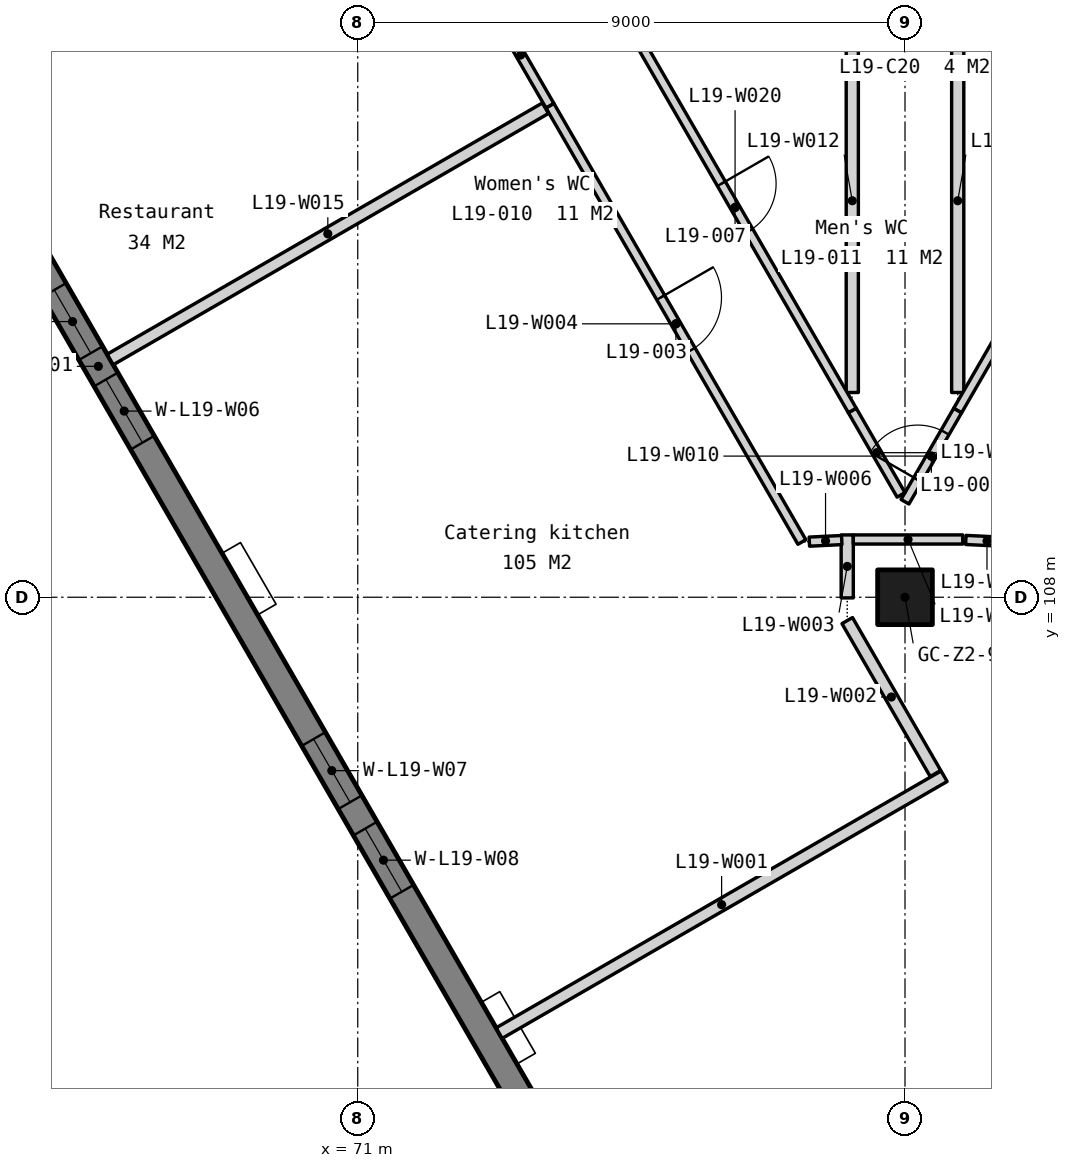
"""IFC4 building model, lengths in metres.
Left out: names, types, materials, properties, quantities, classifications, styles, units other than length and angle.
Written with IfcOpenShell. Run it as: python <this file> out.ifc"""

import sys

from ifc_helpers import new_model, si_unit, direction, frame, frame_2d, origin, origin_2d, place, context, subcontext, project, spatial, polyline, rectangle, outline, extrude, element, fill, save


model = new_model("IFC4")
c1 = context("Model", 3, precision=1e-05, world=origin(), true_north=direction((0.0, 1.0)))
c2 = subcontext(c1, "Body", "Model", "MODEL_VIEW")
j1 = project(units=[si_unit("LENGTHUNIT", "METRE"), si_unit("PLANEANGLEUNIT", "RADIAN")], contexts=[c1])
p1 = place(None, origin())
s1 = spatial("IfcSite", under=j1, at=p1, CompositionType="ELEMENT")
p2 = place(p1, origin())
s2 = spatial("IfcBuilding", under=s1, at=p2, CompositionType="ELEMENT")
p3 = place(p2, frame((0.0, 0.0, 81.8)))
s3 = spatial("IfcBuildingStorey", under=s2, at=p3, CompositionType="ELEMENT", Elevation=81.8)
p4 = place(p3, frame((80.0, 108.0, 0.0), z_axis=(0.0, 0.0, 1.0), x_axis=(1.0, 0.0, 0.0)))
e1 = element("IfcColumn", 1, at=p4, inside=s3, PredefinedType="COLUMN", context=c2, shape_type="SweptSolid", body=[
    extrude(rectangle(XDim=0.9, YDim=0.9, at=origin_2d()), origin(), (0.0, 0.0, 1.0), 3.5),
])
p5 = place(p3, frame((56.073, 130.263, -0.45), z_axis=(0.0, 0.0, 1.0), x_axis=(0.500000478905, -0.866025127289, 0.0)))
e2 = element("IfcWall", 2, at=p5, inside=s3, PredefinedType="SOLIDWALL", context=c2, shape_type="SweptSolid", body=[
    extrude(outline(polyline([(42.643, 0.0), (42.643, 3.8), (0.0, 3.8), (0.0, 0.0), (42.643, 0.0)])), frame((0.0, 0.225, 0.0), z_axis=(0.0, -1.0, 0.0), x_axis=(1.0, 0.0, 0.0)), (0.0, 0.0, 1.0), 0.45),
])
p6 = place(p5, frame((2.814, 0.0, 1.35)))
e3 = element("IfcOpeningElement", 3, at=p6, cuts=e2, PredefinedType="OPENING", context=c2, shape_type="SweptSolid", body=[
    extrude(rectangle(XDim=1.2, YDim=1.5, at=frame_2d((0.6, 0.75))), frame((0.0, 0.235, 0.0), z_axis=(0.0, -1.0, 0.0), x_axis=(1.0, 0.0, 0.0)), (0.0, 0.0, 1.0), 0.47),
])
p7 = place(p5, frame((4.514, 0.0, 1.35)))
e4 = element("IfcOpeningElement", 4, at=p7, cuts=e2, PredefinedType="OPENING", context=c2, shape_type="SweptSolid", body=[
    extrude(rectangle(XDim=1.2, YDim=1.5, at=frame_2d((0.6, 0.75))), frame((0.0, 0.235, 0.0), z_axis=(0.0, -1.0, 0.0), x_axis=(1.0, 0.0, 0.0)), (0.0, 0.0, 1.0), 0.47),
])
p8 = place(p5, frame((11.343, 0.0, 1.35)))
e5 = element("IfcOpeningElement", 5, at=p8, cuts=e2, PredefinedType="OPENING", context=c2, shape_type="SweptSolid", body=[
    extrude(rectangle(XDim=1.2, YDim=1.5, at=frame_2d((0.6, 0.75))), frame((0.0, 0.235, 0.0), z_axis=(0.0, -1.0, 0.0), x_axis=(1.0, 0.0, 0.0)), (0.0, 0.0, 1.0), 0.47),
])
p9 = place(p5, frame((13.043, 0.0, 1.35)))
e6 = element("IfcOpeningElement", 6, at=p9, cuts=e2, PredefinedType="OPENING", context=c2, shape_type="SweptSolid", body=[
    extrude(rectangle(XDim=1.2, YDim=1.5, at=frame_2d((0.6, 0.75))), frame((0.0, 0.235, 0.0), z_axis=(0.0, -1.0, 0.0), x_axis=(1.0, 0.0, 0.0)), (0.0, 0.0, 1.0), 0.47),
])
p10 = place(p5, frame((19.872, 0.0, 1.35)))
e7 = element("IfcOpeningElement", 7, at=p10, cuts=e2, PredefinedType="OPENING", context=c2, shape_type="SweptSolid", body=[
    extrude(rectangle(XDim=1.2, YDim=1.5, at=frame_2d((0.6, 0.75))), frame((0.0, 0.235, 0.0), z_axis=(0.0, -1.0, 0.0), x_axis=(1.0, 0.0, 0.0)), (0.0, 0.0, 1.0), 0.47),
])
p11 = place(p5, frame((21.572, 0.0, 1.35)))
e8 = element("IfcOpeningElement", 8, at=p11, cuts=e2, PredefinedType="OPENING", context=c2, shape_type="SweptSolid", body=[
    extrude(rectangle(XDim=1.2, YDim=1.5, at=frame_2d((0.6, 0.75))), frame((0.0, 0.235, 0.0), z_axis=(0.0, -1.0, 0.0), x_axis=(1.0, 0.0, 0.0)), (0.0, 0.0, 1.0), 0.47),
])
p12 = place(p5, frame((28.4, 0.0, 1.35)))
e9 = element("IfcOpeningElement", 9, at=p12, cuts=e2, PredefinedType="OPENING", context=c2, shape_type="SweptSolid", body=[
    extrude(rectangle(XDim=1.2, YDim=1.5, at=frame_2d((0.6, 0.75))), frame((0.0, 0.235, 0.0), z_axis=(0.0, -1.0, 0.0), x_axis=(1.0, 0.0, 0.0)), (0.0, 0.0, 1.0), 0.47),
])
p13 = place(p5, frame((30.1, 0.0, 1.35)))
e10 = element("IfcOpeningElement", 10, at=p13, cuts=e2, PredefinedType="OPENING", context=c2, shape_type="SweptSolid", body=[
    extrude(rectangle(XDim=1.2, YDim=1.5, at=frame_2d((0.6, 0.75))), frame((0.0, 0.235, 0.0), z_axis=(0.0, -1.0, 0.0), x_axis=(1.0, 0.0, 0.0)), (0.0, 0.0, 1.0), 0.47),
])
p14 = place(p5, frame((36.929, 0.0, 1.35)))
e11 = element("IfcOpeningElement", 11, at=p14, cuts=e2, PredefinedType="OPENING", context=c2, shape_type="SweptSolid", body=[
    extrude(rectangle(XDim=1.2, YDim=1.5, at=frame_2d((0.6, 0.75))), frame((0.0, 0.235, 0.0), z_axis=(0.0, -1.0, 0.0), x_axis=(1.0, 0.0, 0.0)), (0.0, 0.0, 1.0), 0.47),
])
p15 = place(p5, frame((38.629, 0.0, 1.35)))
e12 = element("IfcOpeningElement", 12, at=p15, cuts=e2, PredefinedType="OPENING", context=c2, shape_type="SweptSolid", body=[
    extrude(rectangle(XDim=1.2, YDim=1.5, at=frame_2d((0.6, 0.75))), frame((0.0, 0.235, 0.0), z_axis=(0.0, -1.0, 0.0), x_axis=(1.0, 0.0, 0.0)), (0.0, 0.0, 1.0), 0.47),
])
p16 = place(p3, frame((73.325, 100.831, 0.0), z_axis=(0.0, 0.0, 1.0), x_axis=(0.866029686123, 0.499992582699, 0.0)))
e13 = element("IfcWall", 13, at=p16, inside=s3, PredefinedType="PARTITIONING", context=c2, shape_type="SweptSolid", body=[
    extrude(rectangle(XDim=8.449, YDim=0.2, at=frame_2d((4.225, 0.0))), origin(), (0.0, 0.0, 1.0), 3.35),
])
p17 = place(p3, frame((79.05, 107.616, 0.0), z_axis=(0.0, 0.0, 1.0), x_axis=(0.499829218422, -0.866123982125, 0.0)))
e14 = element("IfcWall", 14, at=p17, inside=s3, PredefinedType="PARTITIONING", context=c2, shape_type="SweptSolid", body=[
    extrude(rectangle(XDim=2.903, YDim=0.2, at=frame_2d((1.452, 0.0))), origin(), (0.0, 0.0, 1.0), 3.35),
])
p18 = place(p3, frame((79.05, 107.989, 0.0), z_axis=(0.0, 0.0, 1.0), x_axis=(0.0, 1.0, 0.0)))
e15 = element("IfcWall", 15, at=p18, inside=s3, PredefinedType="PARTITIONING", context=c2, shape_type="SweptSolid", body=[
    extrude(rectangle(XDim=1.036, YDim=0.2, at=frame_2d((0.518, 0.0))), origin(), (0.0, 0.0, 1.0), 3.35),
])
p19 = place(p3, frame((74.16, 116.085, 0.0), z_axis=(0.0, 0.0, 1.0), x_axis=(0.500048861501, -0.865997191746, 0.0)))
e16 = element("IfcWall", 16, at=p19, inside=s3, PredefinedType="PARTITIONING", context=c2, shape_type="SweptSolid", body=[
    extrude(rectangle(XDim=8.287, YDim=0.15, at=frame_2d((4.144, 0.0))), origin(), (0.0, 0.0, 1.0), 3.35),
])
p20 = place(p19, frame((3.644, 0.0, 0.0)))
e17 = element("IfcOpeningElement", 17, at=p20, cuts=e16, PredefinedType="OPENING", context=c2, shape_type="SweptSolid", body=[
    extrude(rectangle(XDim=1.0, YDim=2.1, at=frame_2d((0.5, 1.05))), frame((0.0, 0.085, 0.0), z_axis=(0.0, -1.0, 0.0), x_axis=(1.0, 0.0, 0.0)), (0.0, 0.0, 1.0), 0.17),
])
p21 = place(p3, frame((81.0, 108.943, 0.0), z_axis=(0.0, 0.0, 1.0), x_axis=(0.998813598292, -0.048696980064, 0.0)))
e18 = element("IfcWall", 18, at=p21, inside=s3, PredefinedType="PARTITIONING", context=c2, shape_type="SweptSolid", body=[
    extrude(rectangle(XDim=0.697, YDim=0.15, at=frame_2d((0.348, 0.0))), origin(), (0.0, 0.0, 1.0), 3.35),
])
p22 = place(p3, frame((78.427, 108.914, 0.0), z_axis=(0.0, 0.0, 1.0), x_axis=(0.998778443094, 0.049412767684, 0.0)))
e19 = element("IfcWall", 19, at=p22, inside=s3, PredefinedType="PARTITIONING", context=c2, shape_type="SweptSolid", body=[
    extrude(rectangle(XDim=0.534, YDim=0.15, at=frame_2d((0.267, 0.0))), origin(), (0.0, 0.0, 1.0), 3.35),
])
p23 = place(p3, frame((79.15, 108.95, 0.0), z_axis=(0.0, 0.0, 1.0), x_axis=(1.0, 0.0, 0.0)))
e20 = element("IfcWall", 20, at=p23, inside=s3, PredefinedType="PARTITIONING", context=c2, shape_type="SweptSolid", body=[
    extrude(rectangle(XDim=1.8, YDim=0.15, at=frame_2d((0.9, 0.0))), origin(), (0.0, 0.0, 1.0), 3.35),
])
p24 = place(p3, frame((80.0, 109.571, 0.0), z_axis=(0.0, 0.0, 1.0), x_axis=(0.49997027332, 0.866042565811, 0.0)))
e21 = element("IfcWall", 21, at=p24, inside=s3, PredefinedType="PARTITIONING", context=c2, shape_type="SweptSolid", body=[
    extrude(rectangle(XDim=1.734, YDim=0.15, at=frame_2d((0.867, 0.0))), origin(), (0.0, 0.0, 1.0), 3.35),
])
p25 = place(p24, frame((0.417, 0.0, 0.0)))
e22 = element("IfcOpeningElement", 22, at=p25, cuts=e21, PredefinedType="OPENING", context=c2, shape_type="SweptSolid", body=[
    extrude(rectangle(XDim=0.9, YDim=2.1, at=frame_2d((0.45, 1.05))), frame((0.0, 0.085, 0.0), z_axis=(0.0, -1.0, 0.0), x_axis=(1.0, 0.0, 0.0)), (0.0, 0.0, 1.0), 0.17),
])
p26 = place(p3, frame((79.133, 111.072, 0.0), z_axis=(0.0, 0.0, 1.0), x_axis=(0.499985955615, -0.866033512162, 0.0)))
e23 = element("IfcWall", 23, at=p26, inside=s3, PredefinedType="PARTITIONING", context=c2, shape_type="SweptSolid", body=[
    extrude(rectangle(XDim=1.604, YDim=0.15, at=frame_2d((0.802, 0.0))), origin(), (0.0, 0.0, 1.0), 3.35),
])
for number, where, z_axis, x_axis in (
    (24, (79.133, 111.367, 0.0), (0.0, 0.0, 1.0), (0.0, 1.0, 0.0)),
    (25, (80.867, 111.367, 0.0), (0.0, 0.0, 1.0), (0.0, 1.0, 0.0)),
):
    element("IfcWall", number, at=place(p3, frame(where, z_axis=z_axis, x_axis=x_axis)), inside=s3, PredefinedType="PARTITIONING", context=c2, shape_type="SweptSolid", body=[
        extrude(rectangle(XDim=6.308, YDim=0.2, at=frame_2d((3.154, 0.0))), origin(), (0.0, 0.0, 1.0), 3.35),
    ])
p27 = place(p3, frame((80.867, 111.072, 0.0), z_axis=(0.0, 0.0, 1.0), x_axis=(0.500007490527, 0.866021079084, 0.0)))
e26 = element("IfcWall", 26, at=p27, inside=s3, PredefinedType="PARTITIONING", context=c2, shape_type="SweptSolid", body=[
    extrude(rectangle(XDim=7.711, YDim=0.15, at=frame_2d((3.855, 0.0))), origin(), (0.0, 0.0, 1.0), 3.35),
])
p28 = place(p27, frame((3.406, 0.0, 0.0)))
e27 = element("IfcOpeningElement", 27, at=p28, cuts=e26, PredefinedType="OPENING", context=c2, shape_type="SweptSolid", body=[
    extrude(rectangle(XDim=0.9, YDim=2.1, at=frame_2d((0.45, 1.05))), frame((0.0, 0.085, 0.0), z_axis=(0.0, -1.0, 0.0), x_axis=(1.0, 0.0, 0.0)), (0.0, 0.0, 1.0), 0.17),
])
p29 = place(p3, frame((66.929, 111.91, 0.0), z_axis=(0.0, 0.0, 1.0), x_axis=(0.866022272496, 0.500005423512, 0.0)))
e28 = element("IfcWall", 28, at=p29, inside=s3, PredefinedType="PARTITIONING", context=c2, shape_type="SweptSolid", body=[
    extrude(rectangle(XDim=8.265, YDim=0.2, at=frame_2d((4.133, 0.0))), origin(), (0.0, 0.0, 1.0), 3.35),
])
p30 = place(p3, frame((73.199, 117.75, 0.0), z_axis=(0.0, 0.0, 1.0), x_axis=(0.499909361484, -0.866077727632, 0.0)))
e29 = element("IfcWall", 29, at=p30, inside=s3, PredefinedType="PARTITIONING", context=c2, shape_type="SweptSolid", body=[
    extrude(rectangle(XDim=1.922, YDim=0.15, at=frame_2d((0.961, 0.0))), origin(), (0.0, 0.0, 1.0), 3.35),
])
p31 = place(p3, frame((75.278, 117.75, 0.0), z_axis=(0.0, 0.0, 1.0), x_axis=(0.500007490527, -0.866021079084, 0.0)))
e30 = element("IfcWall", 30, at=p31, inside=s3, PredefinedType="PARTITIONING", context=c2, shape_type="SweptSolid", body=[
    extrude(rectangle(XDim=7.711, YDim=0.15, at=frame_2d((3.855, 0.0))), origin(), (0.0, 0.0, 1.0), 3.35),
])
p32 = place(p31, frame((3.406, 0.0, 0.0)))
e31 = element("IfcOpeningElement", 31, at=p32, cuts=e30, PredefinedType="OPENING", context=c2, shape_type="SweptSolid", body=[
    extrude(rectangle(XDim=0.9, YDim=2.1, at=frame_2d((0.45, 1.05))), frame((0.0, 0.085, 0.0), z_axis=(0.0, -1.0, 0.0), x_axis=(1.0, 0.0, 0.0)), (0.0, 0.0, 1.0), 0.17),
])
p33 = place(p10, origin())
e32 = element("IfcWindow", 32, at=p33, inside=s3, PartitioningType="SINGLE_PANEL", PredefinedType="WINDOW", context=c2, shape_type="SweptSolid", body=[
    extrude(rectangle(XDim=1.2, YDim=1.5, at=frame_2d((0.6, 0.75))), frame((0.0, 0.03, 0.0), z_axis=(0.0, -1.0, 0.0), x_axis=(1.0, 0.0, 0.0)), (0.0, 0.0, 1.0), 0.06),
])
fill(e7, e32)
p34 = place(p11, origin())
e33 = element("IfcWindow", 33, at=p34, inside=s3, PartitioningType="SINGLE_PANEL", PredefinedType="WINDOW", context=c2, shape_type="SweptSolid", body=[
    extrude(rectangle(XDim=1.2, YDim=1.5, at=frame_2d((0.6, 0.75))), frame((0.0, 0.03, 0.0), z_axis=(0.0, -1.0, 0.0), x_axis=(1.0, 0.0, 0.0)), (0.0, 0.0, 1.0), 0.06),
])
fill(e8, e33)
p35 = place(p12, origin())
e34 = element("IfcWindow", 34, at=p35, inside=s3, PartitioningType="SINGLE_PANEL", PredefinedType="WINDOW", context=c2, shape_type="SweptSolid", body=[
    extrude(rectangle(XDim=1.2, YDim=1.5, at=frame_2d((0.6, 0.75))), frame((0.0, 0.03, 0.0), z_axis=(0.0, -1.0, 0.0), x_axis=(1.0, 0.0, 0.0)), (0.0, 0.0, 1.0), 0.06),
])
fill(e9, e34)
p36 = place(p13, origin())
e35 = element("IfcWindow", 35, at=p36, inside=s3, PartitioningType="SINGLE_PANEL", PredefinedType="WINDOW", context=c2, shape_type="SweptSolid", body=[
    extrude(rectangle(XDim=1.2, YDim=1.5, at=frame_2d((0.6, 0.75))), frame((0.0, 0.03, 0.0), z_axis=(0.0, -1.0, 0.0), x_axis=(1.0, 0.0, 0.0)), (0.0, 0.0, 1.0), 0.06),
])
fill(e10, e35)
p37 = place(p20, origin())
e36 = element("IfcDoor", 36, at=p37, inside=s3, OperationType="SINGLE_SWING_LEFT", PredefinedType="DOOR", context=c2, shape_type="SweptSolid", body=[
    extrude(rectangle(XDim=1.0, YDim=2.1, at=frame_2d((0.5, 1.05))), frame((0.0, 0.025, 0.0), z_axis=(0.0, -1.0, 0.0), x_axis=(1.0, 0.0, 0.0)), (0.0, 0.0, 1.0), 0.05),
])
fill(e17, e36)
p38 = place(p32, origin())
e37 = element("IfcDoor", 37, at=p38, inside=s3, OperationType="SINGLE_SWING_LEFT", PredefinedType="DOOR", context=c2, shape_type="SweptSolid", body=[
    extrude(rectangle(XDim=0.9, YDim=2.1, at=frame_2d((0.45, 1.05))), frame((0.0, 0.025, 0.0), z_axis=(0.0, -1.0, 0.0), x_axis=(1.0, 0.0, 0.0)), (0.0, 0.0, 1.0), 0.05),
])
fill(e31, e37)
p39 = place(p25, origin())
e38 = element("IfcDoor", 38, at=p39, inside=s3, OperationType="SINGLE_SWING_LEFT", PredefinedType="DOOR", context=c2, shape_type="SweptSolid", body=[
    extrude(rectangle(XDim=0.9, YDim=2.1, at=frame_2d((0.45, 1.05))), frame((0.0, 0.025, 0.0), z_axis=(0.0, -1.0, 0.0), x_axis=(1.0, 0.0, 0.0)), (0.0, 0.0, 1.0), 0.05),
])
fill(e22, e38)
save(model, sys.argv[1])
